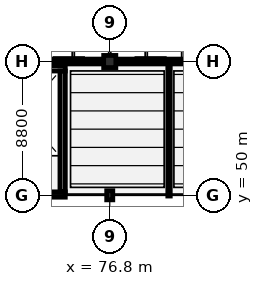
"""IFC4 building model, lengths in metres.
Left out: names, types, materials, properties, quantities, classifications, styles, units other than length and angle.
Written with IfcOpenShell. Run it as: python <this file> out.ifc"""

import sys

from ifc_helpers import new_model, si_unit, direction, frame, frame_2d, origin, origin_2d, place, context, subcontext, project, spatial, polyline, rectangle, outline, extrude, element, fill, save


model = new_model("IFC4")
c1 = context("Model", 3, precision=1e-05, world=origin(), true_north=direction((0.0, 1.0)))
c2 = subcontext(c1, "Body", "Model", "MODEL_VIEW")
j1 = project(units=[si_unit("LENGTHUNIT", "METRE"), si_unit("PLANEANGLEUNIT", "RADIAN")], contexts=[c1])
p1 = place(None, origin())
s1 = spatial("IfcSite", under=j1, at=p1, CompositionType="ELEMENT")
p2 = place(p1, origin())
s2 = spatial("IfcBuilding", under=s1, at=p2, CompositionType="ELEMENT")
p3 = place(p2, frame((0.0, 0.0, 9.6)))
s3 = spatial("IfcBuildingStorey", under=s2, at=p3, CompositionType="ELEMENT", Elevation=9.6)
p4 = place(p3, frame((76.8, 50.0, 0.0), z_axis=(0.0, 0.0, 1.0), x_axis=(1.0, 0.0, 0.0)))
e1 = element("IfcColumn", 1, at=p4, inside=s3, PredefinedType="COLUMN", context=c2, shape_type="SweptSolid", body=[
    extrude(rectangle(XDim=0.4, YDim=0.6, at=origin_2d()), origin(), (0.0, 0.0, 1.0), 4.5),
])
p5 = place(p3, frame((76.8, 58.8, 0.0), z_axis=(0.0, 0.0, 1.0), x_axis=(1.0, 0.0, 0.0)))
e2 = element("IfcColumn", 2, at=p5, inside=s3, PredefinedType="COLUMN", context=c2, shape_type="SweptSolid", body=[
    extrude(rectangle(XDim=0.8, YDim=0.8, at=origin_2d()), origin(), (0.0, 0.0, 1.0), 4.5),
])
p6 = place(p3, frame((67.6, 58.8, 0.0), z_axis=(0.0, 0.0, 1.0), x_axis=(1.0, 0.0, 0.0)))
e3 = element("IfcWall", 3, at=p6, inside=s3, PredefinedType="STANDARD", context=c2, shape_type="SweptSolid", body=[
    extrude(rectangle(XDim=8.8, YDim=0.3, at=frame_2d((4.4, 0.0))), origin(), (0.0, 0.0, 1.0), 1.85),
])
p7 = place(p3, frame((67.6, 58.8, 2.38), z_axis=(0.0, 0.0, 1.0), x_axis=(1.0, 0.0, 0.0)))
e4 = element("IfcWall", 4, at=p7, inside=s3, PredefinedType="STANDARD", context=c2, shape_type="SweptSolid", body=[
    extrude(outline(polyline([(0.0, 0.0), (8.8, 0.0), (8.8, 3.997), (0.0, 3.705), (0.0, 0.0)])), frame((0.0, 0.15, 0.0), z_axis=(0.0, -1.0, 0.0), x_axis=(1.0, 0.0, 0.0)), (0.0, 0.0, 1.0), 0.3),
])
p8 = place(p7, frame((0.85, 0.0, 0.25)))
e5 = element("IfcOpeningElement", 5, at=p8, cuts=e4, PredefinedType="OPENING", context=c2, shape_type="SweptSolid", body=[
    extrude(rectangle(XDim=0.67, YDim=2.29, at=frame_2d((0.335, 1.145))), frame((0.0, 0.16, 0.0), z_axis=(0.0, -1.0, 0.0), x_axis=(1.0, 0.0, 0.0)), (0.0, 0.0, 1.0), 0.32),
])
p9 = place(p7, frame((2.9, 0.0, 0.25)))
e6 = element("IfcOpeningElement", 6, at=p9, cuts=e4, PredefinedType="OPENING", context=c2, shape_type="SweptSolid", body=[
    extrude(rectangle(XDim=0.63, YDim=2.26, at=frame_2d((0.315, 1.13))), frame((0.0, 0.16, 0.0), z_axis=(0.0, -1.0, 0.0), x_axis=(1.0, 0.0, 0.0)), (0.0, 0.0, 1.0), 0.32),
])
p10 = place(p7, frame((4.95, 0.0, 0.25)))
e7 = element("IfcOpeningElement", 7, at=p10, cuts=e4, PredefinedType="OPENING", context=c2, shape_type="SweptSolid", body=[
    extrude(rectangle(XDim=0.75, YDim=2.35, at=frame_2d((0.375, 1.175))), frame((0.0, 0.16, 0.0), z_axis=(0.0, -1.0, 0.0), x_axis=(1.0, 0.0, 0.0)), (0.0, 0.0, 1.0), 0.32),
])
p11 = place(p7, frame((7.0, 0.0, 0.25)))
e8 = element("IfcOpeningElement", 8, at=p11, cuts=e4, PredefinedType="OPENING", context=c2, shape_type="SweptSolid", body=[
    extrude(rectangle(XDim=0.71, YDim=2.32, at=frame_2d((0.355, 1.16))), frame((0.0, 0.16, 0.0), z_axis=(0.0, -1.0, 0.0), x_axis=(1.0, 0.0, 0.0)), (0.0, 0.0, 1.0), 0.32),
])
p12 = place(p3, frame((77.2, 58.8, 0.0), z_axis=(0.0, 0.0, 1.0), x_axis=(1.0, 0.0, 0.0)))
e9 = element("IfcWall", 9, at=p12, inside=s3, PredefinedType="STANDARD", context=c2, shape_type="SweptSolid", body=[
    extrude(rectangle(XDim=8.8, YDim=0.3, at=frame_2d((4.4, 0.0))), origin(), (0.0, 0.0, 1.0), 1.85),
])
p13 = place(p3, frame((77.2, 58.8, 2.38), z_axis=(0.0, 0.0, 1.0), x_axis=(1.0, 0.0, 0.0)))
e10 = element("IfcWall", 10, at=p13, inside=s3, PredefinedType="STANDARD", context=c2, shape_type="SweptSolid", body=[
    extrude(outline(polyline([(0.0, 0.0), (8.8, 0.0), (8.8, 4.1), (0.0, 3.997), (0.0, 0.0)])), frame((0.0, 0.15, 0.0), z_axis=(0.0, -1.0, 0.0), x_axis=(1.0, 0.0, 0.0)), (0.0, 0.0, 1.0), 0.3),
])
p14 = place(p13, frame((0.85, 0.0, 0.25)))
e11 = element("IfcOpeningElement", 11, at=p14, cuts=e10, PredefinedType="OPENING", context=c2, shape_type="SweptSolid", body=[
    extrude(rectangle(XDim=0.67, YDim=2.29, at=frame_2d((0.335, 1.145))), frame((0.0, 0.16, 0.0), z_axis=(0.0, -1.0, 0.0), x_axis=(1.0, 0.0, 0.0)), (0.0, 0.0, 1.0), 0.32),
])
p15 = place(p13, frame((2.9, 0.0, 0.25)))
e12 = element("IfcOpeningElement", 12, at=p15, cuts=e10, PredefinedType="OPENING", context=c2, shape_type="SweptSolid", body=[
    extrude(rectangle(XDim=0.63, YDim=2.26, at=frame_2d((0.315, 1.13))), frame((0.0, 0.16, 0.0), z_axis=(0.0, -1.0, 0.0), x_axis=(1.0, 0.0, 0.0)), (0.0, 0.0, 1.0), 0.32),
])
p16 = place(p13, frame((4.95, 0.0, 0.25)))
e13 = element("IfcOpeningElement", 13, at=p16, cuts=e10, PredefinedType="OPENING", context=c2, shape_type="SweptSolid", body=[
    extrude(rectangle(XDim=0.75, YDim=2.35, at=frame_2d((0.375, 1.175))), frame((0.0, 0.16, 0.0), z_axis=(0.0, -1.0, 0.0), x_axis=(1.0, 0.0, 0.0)), (0.0, 0.0, 1.0), 0.32),
])
p17 = place(p13, frame((7.0, 0.0, 0.25)))
e14 = element("IfcOpeningElement", 14, at=p17, cuts=e10, PredefinedType="OPENING", context=c2, shape_type="SweptSolid", body=[
    extrude(rectangle(XDim=0.71, YDim=2.32, at=frame_2d((0.355, 1.16))), frame((0.0, 0.16, 0.0), z_axis=(0.0, -1.0, 0.0), x_axis=(1.0, 0.0, 0.0)), (0.0, 0.0, 1.0), 0.32),
])
for number, where, z_axis, x_axis in (
    (15, (73.875, 50.05, 0.0), (0.0, 0.0, 1.0), (-1.0, 0.0, 0.0)),
    (16, (68.225, 58.35, 0.0), (0.0, 0.0, 1.0), (1.0, 0.0, 0.0)),
):
    element("IfcWall", number, at=place(p3, frame(where, z_axis=z_axis, x_axis=x_axis)), inside=s3, PredefinedType="SHEAR", context=c2, shape_type="SweptSolid", body=[
        extrude(rectangle(XDim=5.65, YDim=0.35, at=frame_2d((2.825, 0.0))), origin(), (0.0, 0.0, 1.0), 3.85),
    ])
p18 = place(p3, frame((73.7, 58.175, 0.0), z_axis=(0.0, 0.0, 1.0), x_axis=(0.0, -1.0, 0.0)))
e17 = element("IfcWall", 17, at=p18, inside=s3, PredefinedType="SHEAR", context=c2, shape_type="SweptSolid", body=[
    extrude(rectangle(XDim=7.95, YDim=0.35, at=frame_2d((3.975, 0.0))), origin(), (0.0, 0.0, 1.0), 3.85),
])
p19 = place(p18, frame((5.68, 0.0, 0.0)))
e18 = element("IfcOpeningElement", 18, at=p19, cuts=e17, PredefinedType="OPENING", context=c2, shape_type="SweptSolid", body=[
    extrude(rectangle(XDim=2.05, YDim=2.15, at=frame_2d((1.025, 1.075))), frame((0.0, 0.185, 0.0), z_axis=(0.0, -1.0, 0.0), x_axis=(1.0, 0.0, 0.0)), (0.0, 0.0, 1.0), 0.37),
])
p20 = place(p3, frame((80.7, 49.95, 0.0), z_axis=(0.0, 0.0, 1.0), x_axis=(0.0, 1.0, 0.0)))
e19 = element("IfcWall", 19, at=p20, inside=s3, PredefinedType="PARTITIONING", context=c2, shape_type="SweptSolid", body=[
    extrude(rectangle(XDim=8.8, YDim=0.16, at=frame_2d((4.4, 0.0))), origin(), (0.0, 0.0, 1.0), 2.4),
])
p21 = place(p20, frame((3.5, 0.0, 0.0)))
e20 = element("IfcOpeningElement", 20, at=p21, cuts=e19, PredefinedType="OPENING", context=c2, shape_type="SweptSolid", body=[
    extrude(rectangle(XDim=1.8, YDim=2.15, at=frame_2d((0.9, 1.075))), frame((0.0, 0.09, 0.0), z_axis=(0.0, -1.0, 0.0), x_axis=(1.0, 0.0, 0.0)), (0.0, 0.0, 1.0), 0.18),
])
p22 = place(p10, origin())
e21 = element("IfcWindow", 21, at=p22, inside=s3, PartitioningType="SINGLE_PANEL", PredefinedType="WINDOW", context=c2, shape_type="SweptSolid", body=[
    extrude(rectangle(XDim=0.75, YDim=2.35, at=frame_2d((0.375, 1.175))), frame((0.0, 0.03, 0.0), z_axis=(0.0, -1.0, 0.0), x_axis=(1.0, 0.0, 0.0)), (0.0, 0.0, 1.0), 0.06),
])
fill(e7, e21)
p23 = place(p11, origin())
e22 = element("IfcWindow", 22, at=p23, inside=s3, PartitioningType="SINGLE_PANEL", PredefinedType="WINDOW", context=c2, shape_type="SweptSolid", body=[
    extrude(rectangle(XDim=0.71, YDim=2.32, at=frame_2d((0.355, 1.16))), frame((0.0, 0.03, 0.0), z_axis=(0.0, -1.0, 0.0), x_axis=(1.0, 0.0, 0.0)), (0.0, 0.0, 1.0), 0.06),
])
fill(e8, e22)
p24 = place(p14, origin())
e23 = element("IfcWindow", 23, at=p24, inside=s3, PartitioningType="SINGLE_PANEL", PredefinedType="WINDOW", context=c2, shape_type="SweptSolid", body=[
    extrude(rectangle(XDim=0.67, YDim=2.29, at=frame_2d((0.335, 1.145))), frame((0.0, 0.03, 0.0), z_axis=(0.0, -1.0, 0.0), x_axis=(1.0, 0.0, 0.0)), (0.0, 0.0, 1.0), 0.06),
])
fill(e11, e23)
p25 = place(p15, origin())
e24 = element("IfcWindow", 24, at=p25, inside=s3, PartitioningType="SINGLE_PANEL", PredefinedType="WINDOW", context=c2, shape_type="SweptSolid", body=[
    extrude(rectangle(XDim=0.63, YDim=2.26, at=frame_2d((0.315, 1.13))), frame((0.0, 0.03, 0.0), z_axis=(0.0, -1.0, 0.0), x_axis=(1.0, 0.0, 0.0)), (0.0, 0.0, 1.0), 0.06),
])
fill(e12, e24)
p26 = place(p19, origin())
e25 = element("IfcDoor", 25, at=p26, inside=s3, OperationType="DOUBLE_DOOR_SINGLE_SWING", PredefinedType="DOOR", context=c2, shape_type="SweptSolid", body=[
    extrude(rectangle(XDim=2.05, YDim=2.15, at=frame_2d((1.025, 1.075))), frame((0.0, 0.025, 0.0), z_axis=(0.0, -1.0, 0.0), x_axis=(1.0, 0.0, 0.0)), (0.0, 0.0, 1.0), 0.05),
])
fill(e18, e25)
p27 = place(p21, origin())
e26 = element("IfcDoor", 26, at=p27, inside=s3, OperationType="DOUBLE_DOOR_SINGLE_SWING", PredefinedType="DOOR", context=c2, shape_type="SweptSolid", body=[
    extrude(rectangle(XDim=1.8, YDim=2.15, at=frame_2d((0.9, 1.075))), frame((0.0, 0.025, 0.0), z_axis=(0.0, -1.0, 0.0), x_axis=(1.0, 0.0, 0.0)), (0.0, 0.0, 1.0), 0.05),
])
fill(e20, e26)
save(model, sys.argv[1])
